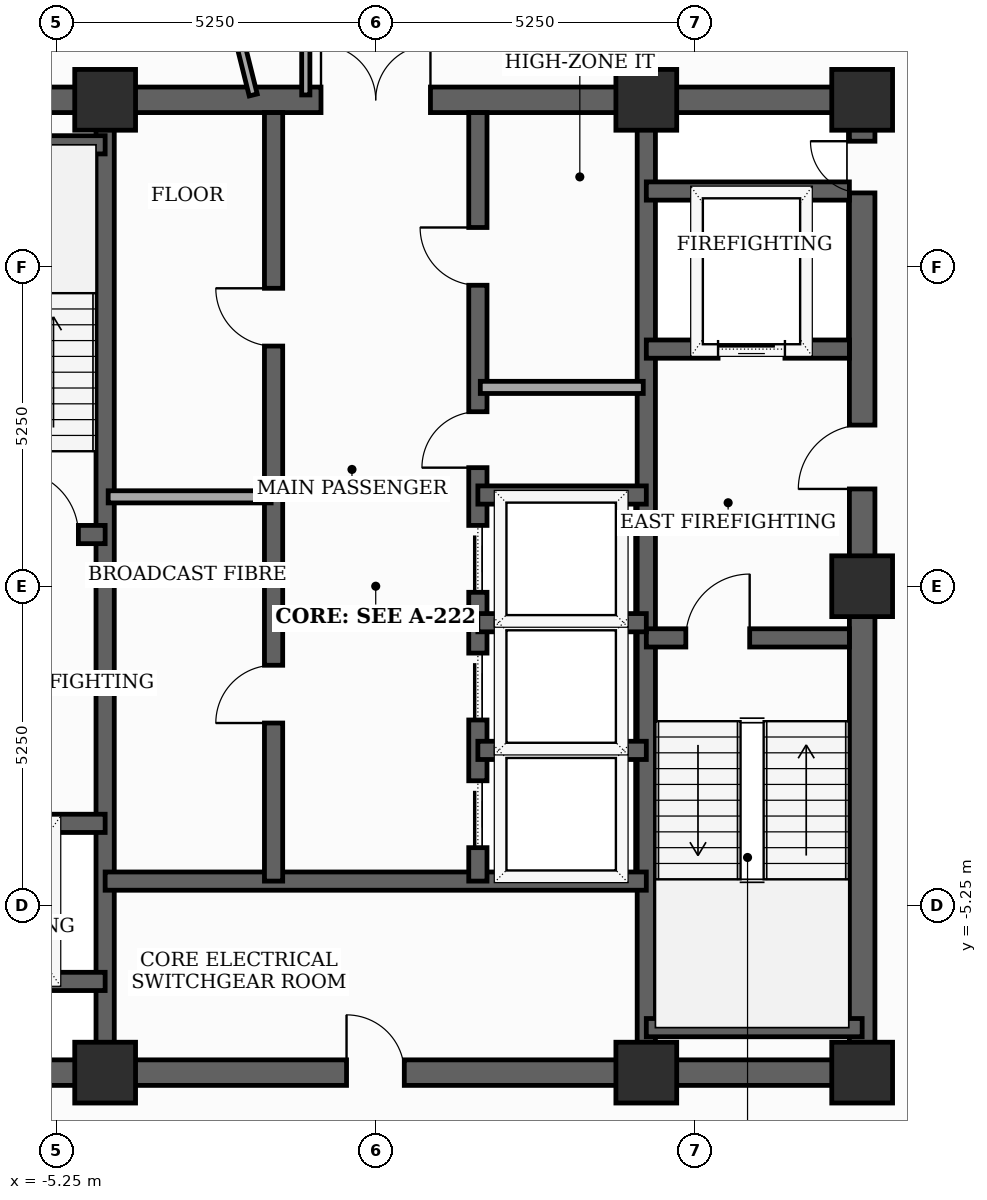
"""IFC4 building model, lengths in metres.
Left out: names, types, materials, properties, quantities, classifications, styles, units other than length and angle.
Written with IfcOpenShell. Run it as: python <this file> out.ifc"""

import sys

from ifc_helpers import new_model, si_unit, direction, frame, frame_2d, origin, origin_2d, place, context, subcontext, project, spatial, rectangle, extrude, element, fill, save


model = new_model("IFC4")
c1 = context("Model", 3, precision=1e-05, world=origin(), true_north=direction((0.0, 1.0)))
c2 = subcontext(c1, "Body", "Model", "MODEL_VIEW")
j1 = project(units=[si_unit("LENGTHUNIT", "METRE"), si_unit("PLANEANGLEUNIT", "RADIAN")], contexts=[c1])
p1 = place(None, origin())
s1 = spatial("IfcSite", under=j1, at=p1, CompositionType="ELEMENT")
p2 = place(p1, origin())
s2 = spatial("IfcBuilding", under=s1, at=p2, CompositionType="ELEMENT")
p3 = place(p2, frame((0.0, 0.0, 283.2)))
s3 = spatial("IfcBuildingStorey", under=s2, at=p3, CompositionType="ELEMENT", Elevation=283.2)
for number, where, z_axis, x_axis in (
    (1, (-4.45, -8.0, 0.0), (0.0, 0.0, 1.0), (1.0, 0.0, 0.0)),
    (2, (4.45, -8.0, 0.0), (0.0, 0.0, 1.0), (1.0, 0.0, 0.0)),
    (3, (8.0, -8.0, 0.0), (0.0, 0.0, 1.0), (1.0, 0.0, 0.0)),
    (4, (8.0, 0.0, 0.0), (0.0, 0.0, 1.0), (1.0, 0.0, 0.0)),
    (5, (8.0, 8.0, 0.0), (0.0, 0.0, 1.0), (1.0, 0.0, 0.0)),
    (6, (4.45, 8.0, 0.0), (0.0, 0.0, 1.0), (1.0, 0.0, 0.0)),
    (7, (-4.45, 8.0, 0.0), (0.0, 0.0, 1.0), (1.0, 0.0, 0.0)),
):
    element("IfcColumn", number, at=place(p3, frame(where, z_axis=z_axis, x_axis=x_axis)), inside=s3, PredefinedType="COLUMN", context=c2, shape_type="SweptSolid", body=[
        extrude(rectangle(XDim=1.0, YDim=1.0, at=origin_2d()), origin(), (0.0, 0.0, 1.0), 3.7),
    ])
p4 = place(p3, frame((8.0, -8.0, 0.0), z_axis=(0.0, 0.0, 1.0), x_axis=(0.0, 1.0, 0.0)))
e8 = element("IfcWall", 8, at=p4, inside=s3, PredefinedType="SHEAR", context=c2, shape_type="SweptSolid", body=[
    extrude(rectangle(XDim=16.0, YDim=0.42, at=frame_2d((8.0, 0.0))), origin(), (0.0, 0.0, 1.0), 3.5),
])
p5 = place(p4, frame((9.6, 0.0, 0.0)))
e9 = element("IfcOpeningElement", 9, at=p5, cuts=e8, PredefinedType="OPENING", context=c2, shape_type="SweptSolid", body=[
    extrude(rectangle(XDim=1.05, YDim=2.15, at=frame_2d((0.525, 1.075))), frame((0.0, 0.22, 0.0), z_axis=(0.0, -1.0, 0.0), x_axis=(1.0, 0.0, 0.0)), (0.0, 0.0, 1.0), 0.44),
])
p6 = place(p4, frame((14.469, 0.0, 0.0)))
e10 = element("IfcOpeningElement", 10, at=p6, cuts=e8, PredefinedType="OPENING", context=c2, shape_type="SweptSolid", body=[
    extrude(rectangle(XDim=0.85, YDim=2.02, at=frame_2d((0.425, 1.01))), frame((0.0, 0.22, 0.0), z_axis=(0.0, -1.0, 0.0), x_axis=(1.0, 0.0, 0.0)), (0.0, 0.0, 1.0), 0.44),
])
p7 = place(p3, frame((-8.0, -8.0, 0.0), z_axis=(0.0, 0.0, 1.0), x_axis=(1.0, 0.0, 0.0)))
e11 = element("IfcWall", 11, at=p7, inside=s3, PredefinedType="SHEAR", context=c2, shape_type="SweptSolid", body=[
    extrude(rectangle(XDim=16.0, YDim=0.42, at=frame_2d((8.0, 0.0))), origin(), (0.0, 0.0, 1.0), 3.5),
])
p8 = place(p7, frame((7.52, 0.0, 0.0)))
e12 = element("IfcOpeningElement", 12, at=p8, cuts=e11, PredefinedType="OPENING", context=c2, shape_type="SweptSolid", body=[
    extrude(rectangle(XDim=0.95, YDim=2.1, at=frame_2d((0.475, 1.05))), frame((0.0, 0.22, 0.0), z_axis=(0.0, -1.0, 0.0), x_axis=(1.0, 0.0, 0.0)), (0.0, 0.0, 1.0), 0.44),
])
p9 = place(p3, frame((-8.0, 8.0, 0.0), z_axis=(0.0, 0.0, 1.0), x_axis=(1.0, 0.0, 0.0)))
e13 = element("IfcWall", 13, at=p9, inside=s3, PredefinedType="SHEAR", context=c2, shape_type="SweptSolid", body=[
    extrude(rectangle(XDim=16.0, YDim=0.42, at=frame_2d((8.0, 0.0))), origin(), (0.0, 0.0, 1.0), 3.5),
])
p10 = place(p9, frame((7.1, 0.0, 0.0)))
e14 = element("IfcOpeningElement", 14, at=p10, cuts=e13, PredefinedType="OPENING", context=c2, shape_type="SweptSolid", body=[
    extrude(rectangle(XDim=1.8, YDim=2.15, at=frame_2d((0.9, 1.075))), frame((0.0, 0.22, 0.0), z_axis=(0.0, -1.0, 0.0), x_axis=(1.0, 0.0, 0.0)), (0.0, 0.0, 1.0), 0.44),
])
for number, where, z_axis, x_axis in (
    (15, (-4.45, -7.79, 0.0), (0.0, 0.0, 1.0), (0.0, 1.0, 0.0)),
    (16, (4.45, -7.79, 0.0), (0.0, 0.0, 1.0), (0.0, 1.0, 0.0)),
):
    element("IfcWall", number, at=place(p3, frame(where, z_axis=z_axis, x_axis=x_axis)), inside=s3, PredefinedType="SHEAR", context=c2, shape_type="SweptSolid", body=[
        extrude(rectangle(XDim=15.58, YDim=0.3, at=frame_2d((7.79, 0.0))), origin(), (0.0, 0.0, 1.0), 3.5),
    ])
p11 = place(p3, frame((-7.79, 0.85, 0.0), z_axis=(0.0, 0.0, 1.0), x_axis=(1.0, 0.0, 0.0)))
e17 = element("IfcWall", 17, at=p11, inside=s3, PredefinedType="SHEAR", context=c2, shape_type="SweptSolid", body=[
    extrude(rectangle(XDim=3.34, YDim=0.3, at=frame_2d((1.67, 0.0))), origin(), (0.0, 0.0, 1.0), 3.5),
])
p12 = place(p11, frame((1.85, 0.0, 0.0)))
e18 = element("IfcOpeningElement", 18, at=p12, cuts=e17, PredefinedType="OPENING", context=c2, shape_type="SweptSolid", body=[
    extrude(rectangle(XDim=1.05, YDim=2.15, at=frame_2d((0.525, 1.075))), frame((0.0, 0.16, 0.0), z_axis=(0.0, -1.0, 0.0), x_axis=(1.0, 0.0, 0.0)), (0.0, 0.0, 1.0), 0.32),
])
p13 = place(p3, frame((-7.79, 7.26, 0.0), z_axis=(0.0, 0.0, 1.0), x_axis=(1.0, 0.0, 0.0)))
e19 = element("IfcWall", 19, at=p13, inside=s3, PredefinedType="SHEAR", context=c2, shape_type="SweptSolid", body=[
    extrude(rectangle(XDim=3.34, YDim=0.3, at=frame_2d((1.67, 0.0))), origin(), (0.0, 0.0, 1.0), 3.5),
])
p14 = place(p3, frame((4.45, -0.85, 0.0), z_axis=(0.0, 0.0, 1.0), x_axis=(1.0, 0.0, 0.0)))
e20 = element("IfcWall", 20, at=p14, inside=s3, PredefinedType="SHEAR", context=c2, shape_type="SweptSolid", body=[
    extrude(rectangle(XDim=3.34, YDim=0.3, at=frame_2d((1.67, 0.0))), origin(), (0.0, 0.0, 1.0), 3.5),
])
p15 = place(p14, frame((0.65, 0.0, 0.0)))
e21 = element("IfcOpeningElement", 21, at=p15, cuts=e20, PredefinedType="OPENING", context=c2, shape_type="SweptSolid", body=[
    extrude(rectangle(XDim=1.05, YDim=2.15, at=frame_2d((0.525, 1.075))), frame((0.0, 0.16, 0.0), z_axis=(0.0, -1.0, 0.0), x_axis=(1.0, 0.0, 0.0)), (0.0, 0.0, 1.0), 0.32),
])
p16 = place(p3, frame((4.45, -7.26, 0.0), z_axis=(0.0, 0.0, 1.0), x_axis=(1.0, 0.0, 0.0)))
e22 = element("IfcWall", 22, at=p16, inside=s3, PredefinedType="SHEAR", context=c2, shape_type="SweptSolid", body=[
    extrude(rectangle(XDim=3.55, YDim=0.3, at=frame_2d((1.775, 0.0))), origin(), (0.0, 0.0, 1.0), 3.5),
])
p17 = place(p3, frame((-7.79, -3.9, 0.0), z_axis=(0.0, 0.0, 1.0), x_axis=(1.0, 0.0, 0.0)))
e23 = element("IfcWall", 23, at=p17, inside=s3, PredefinedType="SHEAR", context=c2, shape_type="SweptSolid", body=[
    extrude(rectangle(XDim=3.34, YDim=0.3, at=frame_2d((1.67, 0.0))), origin(), (0.0, 0.0, 1.0), 3.5),
])
p18 = place(p17, frame((1.27, 0.0, 0.0)))
e24 = element("IfcOpeningElement", 24, at=p18, cuts=e23, PredefinedType="OPENING", context=c2, shape_type="SweptSolid", body=[
    extrude(rectangle(XDim=1.1, YDim=2.1, at=frame_2d((0.55, 1.05))), frame((0.0, 0.16, 0.0), z_axis=(0.0, -1.0, 0.0), x_axis=(1.0, 0.0, 0.0)), (0.0, 0.0, 1.0), 0.32),
])
p19 = place(p3, frame((-7.79, -6.5, 0.0), z_axis=(0.0, 0.0, 1.0), x_axis=(1.0, 0.0, 0.0)))
e25 = element("IfcWall", 25, at=p19, inside=s3, PredefinedType="SHEAR", context=c2, shape_type="SweptSolid", body=[
    extrude(rectangle(XDim=3.34, YDim=0.3, at=frame_2d((1.67, 0.0))), origin(), (0.0, 0.0, 1.0), 3.5),
])
p20 = place(p3, frame((4.45, 3.9, 0.0), z_axis=(0.0, 0.0, 1.0), x_axis=(1.0, 0.0, 0.0)))
e26 = element("IfcWall", 26, at=p20, inside=s3, PredefinedType="SHEAR", context=c2, shape_type="SweptSolid", body=[
    extrude(rectangle(XDim=3.34, YDim=0.3, at=frame_2d((1.67, 0.0))), origin(), (0.0, 0.0, 1.0), 3.5),
])
p21 = place(p20, frame((1.18, 0.0, 0.0)))
e27 = element("IfcOpeningElement", 27, at=p21, cuts=e26, PredefinedType="OPENING", context=c2, shape_type="SweptSolid", body=[
    extrude(rectangle(XDim=1.1, YDim=2.1, at=frame_2d((0.55, 1.05))), frame((0.0, 0.16, 0.0), z_axis=(0.0, -1.0, 0.0), x_axis=(1.0, 0.0, 0.0)), (0.0, 0.0, 1.0), 0.32),
])
p22 = place(p3, frame((4.45, 6.5, 0.0), z_axis=(0.0, 0.0, 1.0), x_axis=(1.0, 0.0, 0.0)))
e28 = element("IfcWall", 28, at=p22, inside=s3, PredefinedType="SHEAR", context=c2, shape_type="SweptSolid", body=[
    extrude(rectangle(XDim=3.34, YDim=0.3, at=frame_2d((1.67, 0.0))), origin(), (0.0, 0.0, 1.0), 3.5),
])
p23 = place(p3, frame((-4.45, -4.85, 0.0), z_axis=(0.0, 0.0, 1.0), x_axis=(1.0, 0.0, 0.0)))
e29 = element("IfcWall", 29, at=p23, inside=s3, PredefinedType="SHEAR", context=c2, shape_type="SweptSolid", body=[
    extrude(rectangle(XDim=8.9, YDim=0.3, at=frame_2d((4.45, 0.0))), origin(), (0.0, 0.0, 1.0), 3.5),
])
p24 = place(p3, frame((-1.68, -4.85, 0.0), z_axis=(0.0, 0.0, 1.0), x_axis=(0.0, 1.0, 0.0)))
e30 = element("IfcWall", 30, at=p24, inside=s3, PredefinedType="SHEAR", context=c2, shape_type="SweptSolid", body=[
    extrude(rectangle(XDim=12.64, YDim=0.3, at=frame_2d((6.32, 0.0))), origin(), (0.0, 0.0, 1.0), 3.5),
])
p25 = place(p24, frame((2.6, 0.0, 0.0)))
e31 = element("IfcOpeningElement", 31, at=p25, cuts=e30, PredefinedType="OPENING", context=c2, shape_type="SweptSolid", body=[
    extrude(rectangle(XDim=0.95, YDim=2.1, at=frame_2d((0.475, 1.05))), frame((0.0, 0.16, 0.0), z_axis=(0.0, -1.0, 0.0), x_axis=(1.0, 0.0, 0.0)), (0.0, 0.0, 1.0), 0.32),
])
p26 = place(p24, frame((8.8, 0.0, 0.0)))
e32 = element("IfcOpeningElement", 32, at=p26, cuts=e30, PredefinedType="OPENING", context=c2, shape_type="SweptSolid", body=[
    extrude(rectangle(XDim=0.95, YDim=2.1, at=frame_2d((0.475, 1.05))), frame((0.0, 0.16, 0.0), z_axis=(0.0, -1.0, 0.0), x_axis=(1.0, 0.0, 0.0)), (0.0, 0.0, 1.0), 0.32),
])
p27 = place(p3, frame((1.68, -4.85, 0.0), z_axis=(0.0, 0.0, 1.0), x_axis=(0.0, 1.0, 0.0)))
e33 = element("IfcWall", 33, at=p27, inside=s3, PredefinedType="SHEAR", context=c2, shape_type="SweptSolid", body=[
    extrude(rectangle(XDim=12.64, YDim=0.3, at=frame_2d((6.32, 0.0))), origin(), (0.0, 0.0, 1.0), 3.5),
])
p28 = place(p27, frame((0.55, 0.0, 0.0)))
e34 = element("IfcOpeningElement", 34, at=p28, cuts=e33, PredefinedType="OPENING", context=c2, shape_type="SweptSolid", body=[
    extrude(rectangle(XDim=1.1, YDim=2.1, at=frame_2d((0.55, 1.05))), frame((0.0, 0.16, 0.0), z_axis=(0.0, -1.0, 0.0), x_axis=(1.0, 0.0, 0.0)), (0.0, 0.0, 1.0), 0.32),
])
p29 = place(p27, frame((2.65, 0.0, 0.0)))
e35 = element("IfcOpeningElement", 35, at=p29, cuts=e33, PredefinedType="OPENING", context=c2, shape_type="SweptSolid", body=[
    extrude(rectangle(XDim=1.1, YDim=2.1, at=frame_2d((0.55, 1.05))), frame((0.0, 0.16, 0.0), z_axis=(0.0, -1.0, 0.0), x_axis=(1.0, 0.0, 0.0)), (0.0, 0.0, 1.0), 0.32),
])
p30 = place(p27, frame((4.75, 0.0, 0.0)))
e36 = element("IfcOpeningElement", 36, at=p30, cuts=e33, PredefinedType="OPENING", context=c2, shape_type="SweptSolid", body=[
    extrude(rectangle(XDim=1.1, YDim=2.1, at=frame_2d((0.55, 1.05))), frame((0.0, 0.16, 0.0), z_axis=(0.0, -1.0, 0.0), x_axis=(1.0, 0.0, 0.0)), (0.0, 0.0, 1.0), 0.32),
])
p31 = place(p27, frame((6.8, 0.0, 0.0)))
e37 = element("IfcOpeningElement", 37, at=p31, cuts=e33, PredefinedType="OPENING", context=c2, shape_type="SweptSolid", body=[
    extrude(rectangle(XDim=0.92, YDim=2.1, at=frame_2d((0.46, 1.05))), frame((0.0, 0.16, 0.0), z_axis=(0.0, -1.0, 0.0), x_axis=(1.0, 0.0, 0.0)), (0.0, 0.0, 1.0), 0.32),
])
p32 = place(p27, frame((9.8, 0.0, 0.0)))
e38 = element("IfcOpeningElement", 38, at=p32, cuts=e33, PredefinedType="OPENING", context=c2, shape_type="SweptSolid", body=[
    extrude(rectangle(XDim=0.95, YDim=2.1, at=frame_2d((0.475, 1.05))), frame((0.0, 0.16, 0.0), z_axis=(0.0, -1.0, 0.0), x_axis=(1.0, 0.0, 0.0)), (0.0, 0.0, 1.0), 0.32),
])
for number, where, z_axis, x_axis in (
    (39, (1.68, 1.5, 0.0), (0.0, 0.0, 1.0), (1.0, 0.0, 0.0)),
    (40, (1.68, -2.7, 0.0), (0.0, 0.0, 1.0), (1.0, 0.0, 0.0)),
    (41, (1.68, -0.6, 0.0), (0.0, 0.0, 1.0), (1.0, 0.0, 0.0)),
):
    element("IfcWall", number, at=place(p3, frame(where, z_axis=z_axis, x_axis=x_axis)), inside=s3, PredefinedType="SHEAR", context=c2, shape_type="SweptSolid", body=[
        extrude(rectangle(XDim=2.77, YDim=0.3, at=frame_2d((1.385, 0.0))), origin(), (0.0, 0.0, 1.0), 3.5),
    ])
for number, where, z_axis, x_axis in (
    (42, (-4.4, 1.47, 0.0), (0.0, 0.0, 1.0), (1.0, 0.0, 0.0)),
    (43, (1.72, 3.27, 0.0), (0.0, 0.0, 1.0), (1.0, 0.0, 0.0)),
):
    element("IfcWall", number, at=place(p3, frame(where, z_axis=z_axis, x_axis=x_axis)), inside=s3, PredefinedType="SOLIDWALL", context=c2, shape_type="SweptSolid", body=[
        extrude(rectangle(XDim=2.68, YDim=0.2, at=frame_2d((1.34, 0.0))), origin(), (0.0, 0.0, 1.0), 3.5),
    ])
p33 = place(p3, frame((-1.15, 10.65, 0.0), z_axis=(0.0, 0.0, 1.0), x_axis=(0.0, -1.0, 0.0)))
e44 = element("IfcWall", 44, at=p33, inside=s3, PredefinedType="PARTITIONING", context=c2, shape_type="SweptSolid", body=[
    extrude(rectangle(XDim=2.57, YDim=0.135, at=frame_2d((1.285, 0.0))), origin(), (0.0, 0.0, 1.0), 2.885),
])
p34 = place(p3, frame((-3.803, 15.255, 0.0), z_axis=(0.0, 0.0, 1.0), x_axis=(0.241851911951, -0.970313172479, 0.0)))
e45 = element("IfcWall", 45, at=p34, inside=s3, PredefinedType="PARTITIONING", context=c2, shape_type="SweptSolid", body=[
    extrude(rectangle(XDim=7.394, YDim=0.135, at=frame_2d((3.697, 0.0))), origin(), (0.0, 0.0, 1.0), 2.885),
])
p35 = place(p5, origin())
e46 = element("IfcDoor", 46, at=p35, inside=s3, OperationType="SINGLE_SWING_LEFT", PredefinedType="DOOR", context=c2, shape_type="SweptSolid", body=[
    extrude(rectangle(XDim=1.05, YDim=2.15, at=frame_2d((0.525, 1.075))), frame((0.0, 0.025, 0.0), z_axis=(0.0, -1.0, 0.0), x_axis=(1.0, 0.0, 0.0)), (0.0, 0.0, 1.0), 0.05),
])
fill(e9, e46)
p36 = place(p6, origin())
e47 = element("IfcDoor", 47, at=p36, inside=s3, OperationType="SINGLE_SWING_RIGHT", PredefinedType="TRAPDOOR", context=c2, shape_type="SweptSolid", body=[
    extrude(rectangle(XDim=0.85, YDim=2.02, at=frame_2d((0.425, 1.01))), frame((0.0, 0.025, 0.0), z_axis=(0.0, -1.0, 0.0), x_axis=(1.0, 0.0, 0.0)), (0.0, 0.0, 1.0), 0.05),
])
fill(e10, e47)
p37 = place(p8, origin())
e48 = element("IfcDoor", 48, at=p37, inside=s3, OperationType="SINGLE_SWING_LEFT", PredefinedType="DOOR", context=c2, shape_type="SweptSolid", body=[
    extrude(rectangle(XDim=0.95, YDim=2.1, at=frame_2d((0.475, 1.05))), frame((0.0, 0.025, 0.0), z_axis=(0.0, -1.0, 0.0), x_axis=(1.0, 0.0, 0.0)), (0.0, 0.0, 1.0), 0.05),
])
fill(e12, e48)
p38 = place(p10, origin())
e49 = element("IfcDoor", 49, at=p38, inside=s3, OperationType="DOUBLE_DOOR_SINGLE_SWING", PredefinedType="DOOR", context=c2, shape_type="SweptSolid", body=[
    extrude(rectangle(XDim=1.8, YDim=2.15, at=frame_2d((0.9, 1.075))), frame((0.0, 0.025, 0.0), z_axis=(0.0, -1.0, 0.0), x_axis=(1.0, 0.0, 0.0)), (0.0, 0.0, 1.0), 0.05),
])
fill(e14, e49)
p39 = place(p12, origin())
e50 = element("IfcDoor", 50, at=p39, inside=s3, OperationType="SINGLE_SWING_LEFT", PredefinedType="DOOR", context=c2, shape_type="SweptSolid", body=[
    extrude(rectangle(XDim=1.05, YDim=2.15, at=frame_2d((0.525, 1.075))), frame((0.0, 0.025, 0.0), z_axis=(0.0, -1.0, 0.0), x_axis=(1.0, 0.0, 0.0)), (0.0, 0.0, 1.0), 0.05),
])
fill(e18, e50)
p40 = place(p15, origin())
e51 = element("IfcDoor", 51, at=p40, inside=s3, OperationType="SINGLE_SWING_RIGHT", PredefinedType="DOOR", context=c2, shape_type="SweptSolid", body=[
    extrude(rectangle(XDim=1.05, YDim=2.15, at=frame_2d((0.525, 1.075))), frame((0.0, 0.025, 0.0), z_axis=(0.0, -1.0, 0.0), x_axis=(1.0, 0.0, 0.0)), (0.0, 0.0, 1.0), 0.05),
])
fill(e21, e51)
p41 = place(p21, origin())
e52 = element("IfcDoor", 52, at=p41, inside=s3, OperationType="SLIDING_TO_LEFT", PredefinedType="DOOR", context=c2, shape_type="SweptSolid", body=[
    extrude(rectangle(XDim=1.1, YDim=2.1, at=frame_2d((0.55, 1.05))), frame((0.0, 0.025, 0.0), z_axis=(0.0, -1.0, 0.0), x_axis=(1.0, 0.0, 0.0)), (0.0, 0.0, 1.0), 0.05),
])
fill(e27, e52)
p42 = place(p25, origin())
e53 = element("IfcDoor", 53, at=p42, inside=s3, OperationType="SINGLE_SWING_LEFT", PredefinedType="DOOR", context=c2, shape_type="SweptSolid", body=[
    extrude(rectangle(XDim=0.95, YDim=2.1, at=frame_2d((0.475, 1.05))), frame((0.0, 0.025, 0.0), z_axis=(0.0, -1.0, 0.0), x_axis=(1.0, 0.0, 0.0)), (0.0, 0.0, 1.0), 0.05),
])
fill(e31, e53)
p43 = place(p26, origin())
e54 = element("IfcDoor", 54, at=p43, inside=s3, OperationType="SINGLE_SWING_RIGHT", PredefinedType="DOOR", context=c2, shape_type="SweptSolid", body=[
    extrude(rectangle(XDim=0.95, YDim=2.1, at=frame_2d((0.475, 1.05))), frame((0.0, 0.025, 0.0), z_axis=(0.0, -1.0, 0.0), x_axis=(1.0, 0.0, 0.0)), (0.0, 0.0, 1.0), 0.05),
])
fill(e32, e54)
p44 = place(p28, origin())
e55 = element("IfcDoor", 55, at=p44, inside=s3, OperationType="SLIDING_TO_LEFT", PredefinedType="DOOR", context=c2, shape_type="SweptSolid", body=[
    extrude(rectangle(XDim=1.1, YDim=2.1, at=frame_2d((0.55, 1.05))), frame((0.0, 0.025, 0.0), z_axis=(0.0, -1.0, 0.0), x_axis=(1.0, 0.0, 0.0)), (0.0, 0.0, 1.0), 0.05),
])
fill(e34, e55)
p45 = place(p29, origin())
e56 = element("IfcDoor", 56, at=p45, inside=s3, OperationType="SLIDING_TO_LEFT", PredefinedType="DOOR", context=c2, shape_type="SweptSolid", body=[
    extrude(rectangle(XDim=1.1, YDim=2.1, at=frame_2d((0.55, 1.05))), frame((0.0, 0.025, 0.0), z_axis=(0.0, -1.0, 0.0), x_axis=(1.0, 0.0, 0.0)), (0.0, 0.0, 1.0), 0.05),
])
fill(e35, e56)
p46 = place(p30, origin())
e57 = element("IfcDoor", 57, at=p46, inside=s3, OperationType="SLIDING_TO_LEFT", PredefinedType="DOOR", context=c2, shape_type="SweptSolid", body=[
    extrude(rectangle(XDim=1.1, YDim=2.1, at=frame_2d((0.55, 1.05))), frame((0.0, 0.025, 0.0), z_axis=(0.0, -1.0, 0.0), x_axis=(1.0, 0.0, 0.0)), (0.0, 0.0, 1.0), 0.05),
])
fill(e36, e57)
p47 = place(p31, origin())
e58 = element("IfcDoor", 58, at=p47, inside=s3, OperationType="SINGLE_SWING_LEFT", PredefinedType="DOOR", context=c2, shape_type="SweptSolid", body=[
    extrude(rectangle(XDim=0.92, YDim=2.1, at=frame_2d((0.46, 1.05))), frame((0.0, 0.025, 0.0), z_axis=(0.0, -1.0, 0.0), x_axis=(1.0, 0.0, 0.0)), (0.0, 0.0, 1.0), 0.05),
])
fill(e37, e58)
p48 = place(p32, origin())
e59 = element("IfcDoor", 59, at=p48, inside=s3, OperationType="SINGLE_SWING_RIGHT", PredefinedType="DOOR", context=c2, shape_type="SweptSolid", body=[
    extrude(rectangle(XDim=0.95, YDim=2.1, at=frame_2d((0.475, 1.05))), frame((0.0, 0.025, 0.0), z_axis=(0.0, -1.0, 0.0), x_axis=(1.0, 0.0, 0.0)), (0.0, 0.0, 1.0), 0.05),
])
fill(e38, e59)
save(model, sys.argv[1])
